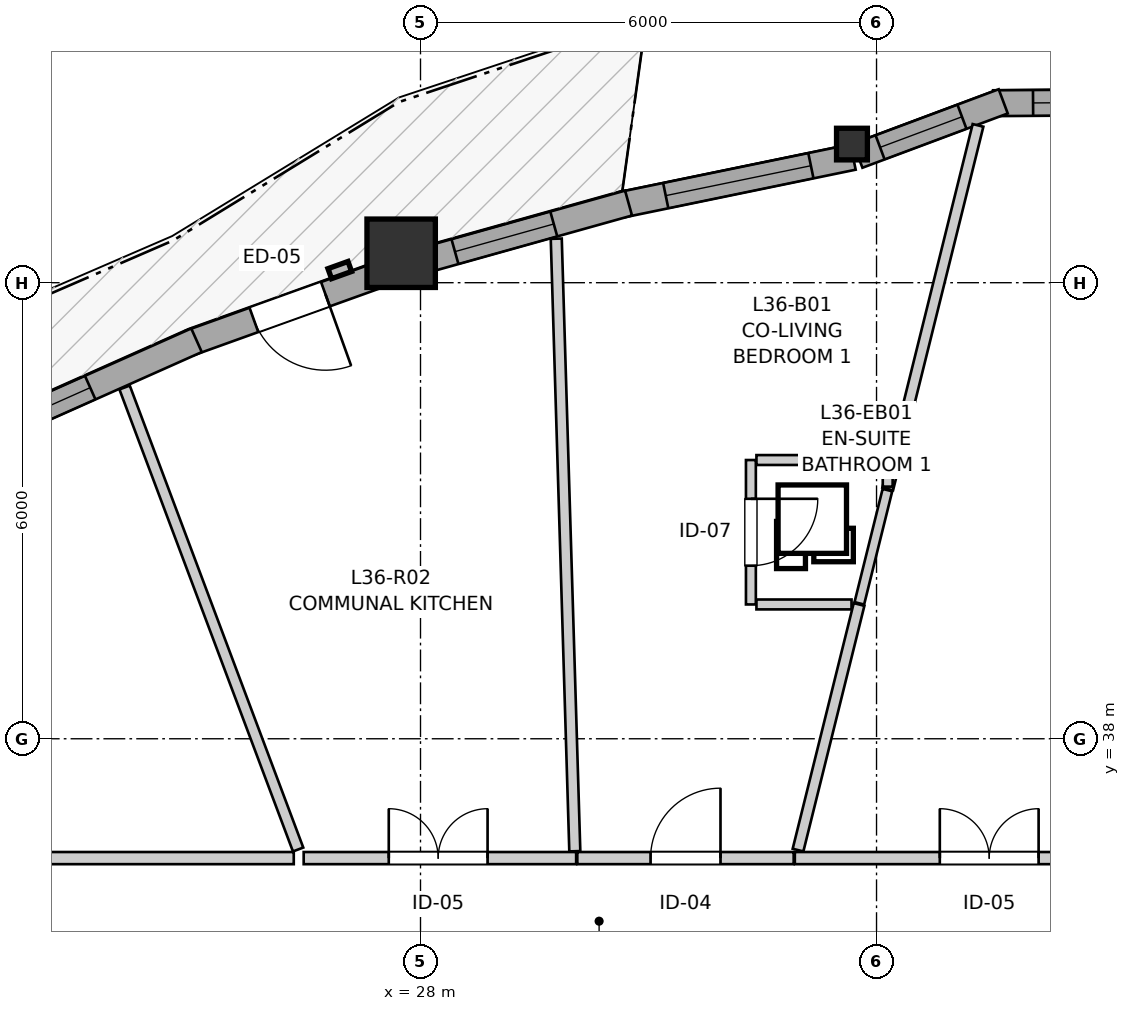
"""IFC4 building model, lengths in metres.
Left out: names, types, materials, properties, quantities, classifications, styles, units other than length and angle.
Written with IfcOpenShell. Run it as: python <this file> out.ifc"""

import sys

from ifc_helpers import new_model, si_unit, direction, frame, frame_2d, origin, origin_2d, place, context, subcontext, project, spatial, rectangle, i_section, extrude, source, transform, mapped, element, fill, save


model = new_model("IFC4")
c1 = context("Model", 3, precision=1e-05, world=origin(), true_north=direction((0.0, 1.0)))
c2 = subcontext(c1, "Body", "Model", "MODEL_VIEW")
j1 = project(units=[si_unit("LENGTHUNIT", "METRE"), si_unit("PLANEANGLEUNIT", "RADIAN")], contexts=[c1])
p1 = place(None, origin())
s1 = spatial("IfcSite", under=j1, at=p1, CompositionType="ELEMENT")
p2 = place(p1, origin())
s2 = spatial("IfcBuilding", under=s1, at=p2, CompositionType="ELEMENT")
p3 = place(p2, frame((0.0, 0.0, 121.6)))
s3 = spatial("IfcBuildingStorey", under=s2, at=p3, CompositionType="ELEMENT", Elevation=121.6)
m1 = source(origin(), c2, "Body", "SweptSolid", [
    extrude(i_section(OverallWidth=0.406, OverallDepth=0.416, WebThickness=0.027, FlangeThickness=0.044, FilletRadius=0.015, at=origin_2d()), origin(), (0.0, 0.0, 1.0), 2.95),
])
p4 = place(p3, frame((33.677, 45.824, 0.0), z_axis=(0.0, 0.0, 1.0), x_axis=(1.0, 0.0, 0.0)))
e1 = element("IfcColumn", 1, at=p4, inside=s3, PredefinedType="PILASTER", context=c2, shape_type="MappedRepresentation", body=[
    mapped(m1, transform((0.0, 0.0, 0.0), x_axis=(1.0, 0.0, 0.0), y_axis=(0.0, 1.0, 0.0), z_axis=(0.0, 0.0, 1.0), scale=1.0)),
])
m2 = source(origin(), c2, "Body", "SweptSolid", [
    extrude(rectangle(XDim=0.9, YDim=0.9, at=origin_2d()), origin(), (0.0, 0.0, 1.0), 2.95),
])
p5 = place(p3, frame((27.746, 44.387, 0.0), z_axis=(0.0, 0.0, 1.0), x_axis=(1.0, 0.0, 0.0)))
e2 = element("IfcColumn", 2, at=p5, inside=s3, PredefinedType="COLUMN", context=c2, shape_type="MappedRepresentation", body=[
    mapped(m2, transform((0.0, 0.0, 0.0), x_axis=(1.0, 0.0, 0.0), y_axis=(0.0, 1.0, 0.0), z_axis=(0.0, 0.0, 1.0), scale=1.0)),
])
p6 = place(p3, frame((37.634, 46.376, 0.0), z_axis=(0.0, 0.0, 1.0), x_axis=(-0.999976456891, -0.00686189939, 0.0)))
e3 = element("IfcWall", 3, at=p6, inside=s3, PredefinedType="SOLIDWALL", context=c2, shape_type="SweptSolid", body=[
    extrude(rectangle(XDim=2.099, YDim=0.34, at=frame_2d((1.05, 0.0))), origin(), (0.0, 0.0, 1.0), 2.48),
])
p7 = place(p6, frame((0.524, 0.0, 0.82)))
e4 = element("IfcOpeningElement", 4, at=p7, cuts=e3, PredefinedType="OPENING", context=c2, shape_type="SweptSolid", body=[
    extrude(rectangle(XDim=1.05, YDim=1.45, at=frame_2d((0.525, 0.725))), frame((0.0, 0.18, 0.0), z_axis=(0.0, -1.0, 0.0), x_axis=(1.0, 0.0, 0.0)), (0.0, 0.0, 1.0), 0.36),
])
p8 = place(p3, frame((35.667, 46.386, 0.0), z_axis=(0.0, 0.0, 1.0), x_axis=(-0.936761017964, -0.34996970615, 0.0)))
e5 = element("IfcWall", 5, at=p8, inside=s3, PredefinedType="SOLIDWALL", context=c2, shape_type="SweptSolid", body=[
    extrude(rectangle(XDim=2.041, YDim=0.34, at=frame_2d((1.021, 0.0))), origin(), (0.0, 0.0, 1.0), 2.48),
])
p9 = place(p8, frame((0.579, 0.0, 0.82)))
e6 = element("IfcOpeningElement", 6, at=p9, cuts=e5, PredefinedType="OPENING", context=c2, shape_type="SweptSolid", body=[
    extrude(rectangle(XDim=1.15, YDim=1.2, at=frame_2d((0.575, 0.6))), frame((0.0, 0.18, 0.0), z_axis=(0.0, -1.0, 0.0), x_axis=(1.0, 0.0, 0.0)), (0.0, 0.0, 1.0), 0.36),
])
p10 = place(p3, frame((33.691, 45.653, 0.0), z_axis=(0.0, 0.0, 1.0), x_axis=(-0.979414063846, -0.201861565287, 0.0)))
e7 = element("IfcWall", 7, at=p10, inside=s3, PredefinedType="SOLIDWALL", context=c2, shape_type="SweptSolid", body=[
    extrude(rectangle(XDim=3.104, YDim=0.34, at=frame_2d((1.552, 0.0))), origin(), (0.0, 0.0, 1.0), 2.48),
])
p11 = place(p10, frame((0.567, 0.0, 0.82)))
e8 = element("IfcOpeningElement", 8, at=p11, cuts=e7, PredefinedType="OPENING", context=c2, shape_type="SweptSolid", body=[
    extrude(rectangle(XDim=1.95, YDim=1.4, at=frame_2d((0.975, 0.7))), frame((0.0, 0.18, 0.0), z_axis=(0.0, -1.0, 0.0), x_axis=(1.0, 0.0, 0.0)), (0.0, 0.0, 1.0), 0.36),
])
p12 = place(p3, frame((30.737, 45.048, 0.0), z_axis=(0.0, 0.0, 1.0), x_axis=(-0.963026728711, -0.26940586443, 0.0)))
e9 = element("IfcWall", 9, at=p12, inside=s3, PredefinedType="SOLIDWALL", context=c2, shape_type="SweptSolid", body=[
    extrude(rectangle(XDim=2.829, YDim=0.34, at=frame_2d((1.415, 0.0))), origin(), (0.0, 0.0, 1.0), 2.48),
])
p13 = place(p12, frame((1.021, 0.0, 0.82)))
e10 = element("IfcOpeningElement", 10, at=p13, cuts=e9, PredefinedType="OPENING", context=c2, shape_type="SweptSolid", body=[
    extrude(rectangle(XDim=1.35, YDim=1.45, at=frame_2d((0.675, 0.725))), frame((0.0, 0.18, 0.0), z_axis=(0.0, -1.0, 0.0), x_axis=(1.0, 0.0, 0.0)), (0.0, 0.0, 1.0), 0.36),
])
p14 = place(p3, frame((27.586, 44.149, 0.0), z_axis=(0.0, 0.0, 1.0), x_axis=(-0.941112277287, -0.338094190338, 0.0)))
e11 = element("IfcWall", 11, at=p14, inside=s3, PredefinedType="SOLIDWALL", context=c2, shape_type="SweptSolid", body=[
    extrude(rectangle(XDim=2.779, YDim=0.34, at=frame_2d((1.39, 0.0))), origin(), (0.0, 0.0, 1.0), 2.48),
])
p15 = place(p14, frame((0.89, 0.0, 0.0)))
e12 = element("IfcOpeningElement", 12, at=p15, cuts=e11, PredefinedType="OPENING", context=c2, shape_type="SweptSolid", body=[
    extrude(rectangle(XDim=1.0, YDim=2.1, at=frame_2d((0.5, 1.05))), frame((0.0, 0.18, 0.0), z_axis=(0.0, -1.0, 0.0), x_axis=(1.0, 0.0, 0.0)), (0.0, 0.0, 1.0), 0.36),
])
p16 = place(p3, frame((25.053, 43.243, 0.0), z_axis=(0.0, 0.0, 1.0), x_axis=(-0.91339900063, -0.407065431655, 0.0)))
e13 = element("IfcWall", 13, at=p16, inside=s3, PredefinedType="SOLIDWALL", context=c2, shape_type="SweptSolid", body=[
    extrude(rectangle(XDim=2.956, YDim=0.34, at=frame_2d((1.478, 0.0))), origin(), (0.0, 0.0, 1.0), 2.48),
])
p17 = place(p16, frame((1.531, 0.0, 0.82)))
e14 = element("IfcOpeningElement", 14, at=p17, cuts=e13, PredefinedType="OPENING", context=c2, shape_type="SweptSolid", body=[
    extrude(rectangle(XDim=0.95, YDim=1.35, at=frame_2d((0.475, 0.675))), frame((0.0, 0.18, 0.0), z_axis=(0.0, -1.0, 0.0), x_axis=(1.0, 0.0, 0.0)), (0.0, 0.0, 1.0), 0.36),
])
p18 = place(p3, frame((32.925, 36.43, 0.0), z_axis=(0.0, 0.0, 1.0), x_axis=(1.0, 0.0, 0.0)))
e15 = element("IfcWall", 15, at=p18, inside=s3, PredefinedType="PARTITIONING", context=c2, shape_type="SweptSolid", body=[
    extrude(rectangle(XDim=5.118, YDim=0.16, at=frame_2d((2.559, 0.0))), origin(), (0.0, 0.0, 1.0), 2.588),
])
p19 = place(p18, frame((1.907, 0.0, 0.0)))
e16 = element("IfcOpeningElement", 16, at=p19, cuts=e15, PredefinedType="OPENING", context=c2, shape_type="SweptSolid", body=[
    extrude(rectangle(XDim=1.3, YDim=2.1, at=frame_2d((0.65, 1.05))), frame((0.0, 0.09, 0.0), z_axis=(0.0, -1.0, 0.0), x_axis=(1.0, 0.0, 0.0)), (0.0, 0.0, 1.0), 0.18),
])
p20 = place(p3, frame((26.463, 36.43, 0.0), z_axis=(0.0, 0.0, 1.0), x_axis=(1.0, 0.0, 0.0)))
e17 = element("IfcWall", 17, at=p20, inside=s3, PredefinedType="PARTITIONING", context=c2, shape_type="SweptSolid", body=[
    extrude(rectangle(XDim=3.585, YDim=0.16, at=frame_2d((1.792, 0.0))), origin(), (0.0, 0.0, 1.0), 2.95),
])
p21 = place(p20, frame((1.119, 0.0, 0.0)))
e18 = element("IfcOpeningElement", 18, at=p21, cuts=e17, PredefinedType="OPENING", context=c2, shape_type="SweptSolid", body=[
    extrude(rectangle(XDim=1.3, YDim=2.1, at=frame_2d((0.65, 1.05))), frame((0.0, 0.09, 0.0), z_axis=(0.0, -1.0, 0.0), x_axis=(1.0, 0.0, 0.0)), (0.0, 0.0, 1.0), 0.18),
])
p22 = place(p3, frame((30.063, 36.43, 0.0), z_axis=(0.0, 0.0, 1.0), x_axis=(1.0, 0.0, 0.0)))
e19 = element("IfcWall", 19, at=p22, inside=s3, PredefinedType="PARTITIONING", context=c2, shape_type="SweptSolid", body=[
    extrude(rectangle(XDim=2.847, YDim=0.16, at=frame_2d((1.423, 0.0))), origin(), (0.0, 0.0, 1.0), 2.95),
])
p23 = place(p22, frame((0.964, 0.0, 0.0)))
e20 = element("IfcOpeningElement", 20, at=p23, cuts=e19, PredefinedType="OPENING", context=c2, shape_type="SweptSolid", body=[
    extrude(rectangle(XDim=0.92, YDim=2.1, at=frame_2d((0.46, 1.05))), frame((0.0, 0.09, 0.0), z_axis=(0.0, -1.0, 0.0), x_axis=(1.0, 0.0, 0.0)), (0.0, 0.0, 1.0), 0.18),
])
p24 = place(p3, frame((32.347, 41.667, 0.0), z_axis=(0.0, 0.0, 1.0), x_axis=(0.0, -1.0, 0.0)))
e21 = element("IfcWall", 21, at=p24, inside=s3, PredefinedType="PARTITIONING", context=c2, shape_type="SweptSolid", body=[
    extrude(rectangle(XDim=1.9, YDim=0.13, at=frame_2d((0.95, 0.0))), origin(), (0.0, 0.0, 1.0), 2.95),
])
p25 = place(p24, frame((0.51, 0.0, 0.0)))
e22 = element("IfcOpeningElement", 22, at=p25, cuts=e21, PredefinedType="OPENING", context=c2, shape_type="SweptSolid", body=[
    extrude(rectangle(XDim=0.88, YDim=2.05, at=frame_2d((0.44, 1.025))), frame((0.0, 0.075, 0.0), z_axis=(0.0, -1.0, 0.0), x_axis=(1.0, 0.0, 0.0)), (0.0, 0.0, 1.0), 0.15),
])
p26 = place(p3, frame((29.786, 44.579, 0.0), z_axis=(0.0, 0.0, 1.0), x_axis=(0.030281792334, -0.99954140137, 0.0)))
e23 = element("IfcWall", 23, at=p26, inside=s3, PredefinedType="PARTITIONING", context=c2, shape_type="SweptSolid", body=[
    extrude(rectangle(XDim=8.062, YDim=0.145, at=frame_2d((4.031, 0.0))), origin(), (0.0, 0.0, 1.0), 2.95),
])
p27 = place(p3, frame((24.107, 42.621, 0.0), z_axis=(0.0, 0.0, 1.0), x_axis=(0.351605509999, -0.93614826034, 0.0)))
e24 = element("IfcWall", 24, at=p27, inside=s3, PredefinedType="PARTITIONING", context=c2, shape_type="SweptSolid", body=[
    extrude(rectangle(XDim=6.493, YDim=0.145, at=frame_2d((3.247, 0.0))), origin(), (0.0, 0.0, 1.0), 2.95),
])
p28 = place(p3, frame((34.147, 41.286, 0.0), z_axis=(0.0, 0.0, 1.0), x_axis=(0.241055314039, 0.970511378384, 0.0)))
e25 = element("IfcWall", 25, at=p28, inside=s3, PredefinedType="PARTITIONING", context=c2, shape_type="SweptSolid", body=[
    extrude(rectangle(XDim=4.929, YDim=0.145, at=frame_2d((2.465, 0.0))), origin(), (0.0, 0.0, 1.0), 2.95),
])
p29 = place(p3, frame((22.258, 36.43, 0.0), z_axis=(0.0, 0.0, 1.0), x_axis=(1.0, 0.0, 0.0)))
e26 = element("IfcWall", 26, at=p29, inside=s3, PredefinedType="PARTITIONING", context=c2, shape_type="SweptSolid", body=[
    extrude(rectangle(XDim=4.074, YDim=0.16, at=frame_2d((2.037, 0.0))), origin(), (0.0, 0.0, 1.0), 2.588),
])
p30 = place(p3, frame((32.967, 36.535, 0.0), z_axis=(0.0, 0.0, 1.0), x_axis=(0.241120890255, 0.970495088232, 0.0)))
e27 = element("IfcWall", 27, at=p30, inside=s3, PredefinedType="PARTITIONING", context=c2, shape_type="SweptSolid", body=[
    extrude(rectangle(XDim=3.33, YDim=0.145, at=frame_2d((1.665, 0.0))), origin(), (0.0, 0.0, 1.0), 2.95),
])
p31 = place(p3, frame((32.42, 41.667, 0.0), z_axis=(0.0, 0.0, 1.0), x_axis=(1.0, 0.0, 0.0)))
e28 = element("IfcWall", 28, at=p31, inside=s3, PredefinedType="PARTITIONING", context=c2, shape_type="SweptSolid", body=[
    extrude(rectangle(XDim=1.628, YDim=0.13, at=frame_2d((0.814, 0.0))), origin(), (0.0, 0.0, 1.0), 2.95),
])
p32 = place(p3, frame((33.774, 39.781, 0.0), z_axis=(0.0, 0.0, 1.0), x_axis=(0.240776504653, 0.970580586457, 0.0)))
e29 = element("IfcWall", 29, at=p32, inside=s3, PredefinedType="PARTITIONING", context=c2, shape_type="SweptSolid", body=[
    extrude(rectangle(XDim=1.535, YDim=0.13, at=frame_2d((0.768, 0.0))), origin(), (0.0, 0.0, 1.0), 2.95),
])
p33 = place(p3, frame((32.42, 39.767, 0.0), z_axis=(0.0, 0.0, 1.0), x_axis=(1.0, 0.0, 0.0)))
e30 = element("IfcWall", 30, at=p33, inside=s3, PredefinedType="PARTITIONING", context=c2, shape_type="SweptSolid", body=[
    extrude(rectangle(XDim=1.251, YDim=0.13, at=frame_2d((0.625, 0.0))), origin(), (0.0, 0.0, 1.0), 2.95),
])
p34 = place(p3, frame((34.147, 41.317, 0.0), z_axis=(0.0, 0.0, 1.0), x_axis=(0.0, 1.0, 0.0)))
e31 = element("IfcWall", 31, at=p34, inside=s3, PredefinedType="PARTITIONING", context=c2, shape_type="SweptSolid", body=[
    extrude(rectangle(XDim=0.35, YDim=0.13, at=frame_2d((0.175, 0.0))), origin(), (0.0, 0.0, 1.0), 2.95),
])
m3 = source(origin(), c2, "Body", "SweptSolid", [
    extrude(rectangle(XDim=1.05, YDim=1.45, at=frame_2d((0.525, 0.725))), frame((0.0, 0.03, 0.0), z_axis=(0.0, -1.0, 0.0), x_axis=(1.0, 0.0, 0.0)), (0.0, 0.0, 1.0), 0.06),
])
p35 = place(p7, origin())
e32 = element("IfcWindow", 32, at=p35, inside=s3, PartitioningType="SINGLE_PANEL", PredefinedType="WINDOW", context=c2, shape_type="MappedRepresentation", body=[
    mapped(m3, transform((0.0, 0.0, 0.0), x_axis=(1.0, 0.0, 0.0), y_axis=(0.0, 1.0, 0.0), z_axis=(0.0, 0.0, 1.0), scale=1.0)),
])
fill(e4, e32)
m4 = source(origin(), c2, "Body", "SweptSolid", [
    extrude(rectangle(XDim=1.15, YDim=1.2, at=frame_2d((0.575, 0.6))), frame((0.0, 0.03, 0.0), z_axis=(0.0, -1.0, 0.0), x_axis=(1.0, 0.0, 0.0)), (0.0, 0.0, 1.0), 0.06),
])
p36 = place(p9, origin())
e33 = element("IfcWindow", 33, at=p36, inside=s3, PartitioningType="SINGLE_PANEL", PredefinedType="WINDOW", context=c2, shape_type="MappedRepresentation", body=[
    mapped(m4, transform((0.0, 0.0, 0.0), x_axis=(1.0, 0.0, 0.0), y_axis=(0.0, 1.0, 0.0), z_axis=(0.0, 0.0, 1.0), scale=1.0)),
])
fill(e6, e33)
m5 = source(origin(), c2, "Body", "SweptSolid", [
    extrude(rectangle(XDim=1.95, YDim=1.4, at=frame_2d((0.975, 0.7))), frame((0.0, 0.03, 0.0), z_axis=(0.0, -1.0, 0.0), x_axis=(1.0, 0.0, 0.0)), (0.0, 0.0, 1.0), 0.06),
])
p37 = place(p11, origin())
e34 = element("IfcWindow", 34, at=p37, inside=s3, PartitioningType="SINGLE_PANEL", PredefinedType="WINDOW", context=c2, shape_type="MappedRepresentation", body=[
    mapped(m5, transform((0.0, 0.0, 0.0), x_axis=(1.0, 0.0, 0.0), y_axis=(0.0, 1.0, 0.0), z_axis=(0.0, 0.0, 1.0), scale=1.0)),
])
fill(e8, e34)
m6 = source(origin(), c2, "Body", "SweptSolid", [
    extrude(rectangle(XDim=1.35, YDim=1.45, at=frame_2d((0.675, 0.725))), frame((0.0, 0.03, 0.0), z_axis=(0.0, -1.0, 0.0), x_axis=(1.0, 0.0, 0.0)), (0.0, 0.0, 1.0), 0.06),
])
p38 = place(p13, origin())
e35 = element("IfcWindow", 35, at=p38, inside=s3, PartitioningType="SINGLE_PANEL", PredefinedType="WINDOW", context=c2, shape_type="MappedRepresentation", body=[
    mapped(m6, transform((0.0, 0.0, 0.0), x_axis=(1.0, 0.0, 0.0), y_axis=(0.0, 1.0, 0.0), z_axis=(0.0, 0.0, 1.0), scale=1.0)),
])
fill(e10, e35)
m7 = source(origin(), c2, "Body", "SweptSolid", [
    extrude(rectangle(XDim=0.95, YDim=1.35, at=frame_2d((0.475, 0.675))), frame((0.0, 0.03, 0.0), z_axis=(0.0, -1.0, 0.0), x_axis=(1.0, 0.0, 0.0)), (0.0, 0.0, 1.0), 0.06),
])
p39 = place(p17, origin())
e36 = element("IfcWindow", 36, at=p39, inside=s3, PartitioningType="SINGLE_PANEL", PredefinedType="WINDOW", context=c2, shape_type="MappedRepresentation", body=[
    mapped(m7, transform((0.0, 0.0, 0.0), x_axis=(1.0, 0.0, 0.0), y_axis=(0.0, 1.0, 0.0), z_axis=(0.0, 0.0, 1.0), scale=1.0)),
])
fill(e14, e36)
m8 = source(origin(), c2, "Body", "SweptSolid", [
    extrude(rectangle(XDim=1.0, YDim=2.1, at=frame_2d((0.5, 1.05))), frame((0.0, 0.025, 0.0), z_axis=(0.0, -1.0, 0.0), x_axis=(1.0, 0.0, 0.0)), (0.0, 0.0, 1.0), 0.05),
])
p40 = place(p15, origin())
e37 = element("IfcDoor", 37, at=p40, inside=s3, OperationType="SINGLE_SWING_LEFT", PredefinedType="DOOR", context=c2, shape_type="MappedRepresentation", body=[
    mapped(m8, transform((0.0, 0.0, 0.0), x_axis=(1.0, 0.0, 0.0), y_axis=(0.0, 1.0, 0.0), z_axis=(0.0, 0.0, 1.0), scale=1.0)),
])
fill(e12, e37)
m9 = source(origin(), c2, "Body", "SweptSolid", [
    extrude(rectangle(XDim=1.3, YDim=2.1, at=frame_2d((0.65, 1.05))), frame((0.0, 0.025, 0.0), z_axis=(0.0, -1.0, 0.0), x_axis=(1.0, 0.0, 0.0)), (0.0, 0.0, 1.0), 0.05),
])
p41 = place(p19, origin())
e38 = element("IfcDoor", 38, at=p41, inside=s3, OperationType="DOUBLE_DOOR_SINGLE_SWING", PredefinedType="DOOR", context=c2, shape_type="MappedRepresentation", body=[
    mapped(m9, transform((0.0, 0.0, 0.0), x_axis=(1.0, 0.0, 0.0), y_axis=(0.0, 1.0, 0.0), z_axis=(0.0, 0.0, 1.0), scale=1.0)),
])
fill(e16, e38)
p42 = place(p21, origin())
e39 = element("IfcDoor", 39, at=p42, inside=s3, OperationType="DOUBLE_DOOR_SINGLE_SWING", PredefinedType="DOOR", context=c2, shape_type="MappedRepresentation", body=[
    mapped(m9, transform((0.0, 0.0, 0.0), x_axis=(1.0, 0.0, 0.0), y_axis=(0.0, 1.0, 0.0), z_axis=(0.0, 0.0, 1.0), scale=1.0)),
])
fill(e18, e39)
m10 = source(origin(), c2, "Body", "SweptSolid", [
    extrude(rectangle(XDim=0.92, YDim=2.1, at=frame_2d((0.46, 1.05))), frame((0.0, 0.025, 0.0), z_axis=(0.0, -1.0, 0.0), x_axis=(1.0, 0.0, 0.0)), (0.0, 0.0, 1.0), 0.05),
])
p43 = place(p23, origin())
e40 = element("IfcDoor", 40, at=p43, inside=s3, OperationType="SINGLE_SWING_RIGHT", PredefinedType="DOOR", context=c2, shape_type="MappedRepresentation", body=[
    mapped(m10, transform((0.0, 0.0, 0.0), x_axis=(1.0, 0.0, 0.0), y_axis=(0.0, 1.0, 0.0), z_axis=(0.0, 0.0, 1.0), scale=1.0)),
])
fill(e20, e40)
m11 = source(origin(), c2, "Body", "SweptSolid", [
    extrude(rectangle(XDim=0.88, YDim=2.05, at=frame_2d((0.44, 1.025))), frame((0.0, 0.025, 0.0), z_axis=(0.0, -1.0, 0.0), x_axis=(1.0, 0.0, 0.0)), (0.0, 0.0, 1.0), 0.05),
])
p44 = place(p25, origin())
e41 = element("IfcDoor", 41, at=p44, inside=s3, OperationType="SINGLE_SWING_LEFT", PredefinedType="DOOR", context=c2, shape_type="MappedRepresentation", body=[
    mapped(m11, transform((0.0, 0.0, 0.0), x_axis=(1.0, 0.0, 0.0), y_axis=(0.0, 1.0, 0.0), z_axis=(0.0, 0.0, 1.0), scale=1.0)),
])
fill(e22, e41)
save(model, sys.argv[1])
